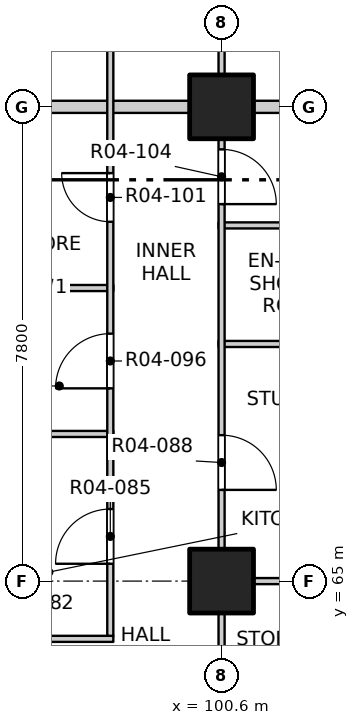
"""IFC4 building model, lengths in metres.
Left out: names, types, materials, properties, quantities, classifications, styles, units other than length and angle.
Written with IfcOpenShell. Run it as: python <this file> out.ifc"""

import sys

from ifc_helpers import new_model, si_unit, direction, frame, frame_2d, origin, origin_2d, place, context, subcontext, project, spatial, rectangle, extrude, element, fill, save


model = new_model("IFC4")
c1 = context("Model", 3, precision=1e-05, world=origin(), true_north=direction((0.0, 1.0)))
c2 = subcontext(c1, "Body", "Model", "MODEL_VIEW")
j1 = project(units=[si_unit("LENGTHUNIT", "METRE"), si_unit("PLANEANGLEUNIT", "RADIAN")], contexts=[c1])
p1 = place(None, origin())
s1 = spatial("IfcSite", under=j1, at=p1, CompositionType="ELEMENT")
p2 = place(p1, origin())
s2 = spatial("IfcBuilding", under=s1, at=p2, CompositionType="ELEMENT")
p3 = place(p2, frame((0.0, 0.0, 58.0)))
s3 = spatial("IfcBuildingStorey", under=s2, at=p3, CompositionType="ELEMENT", Elevation=58.0)
for number, where, z_axis, x_axis in (
    (1, (100.6, 65.0, -0.25), (0.0, 0.0, 1.0), (1.0, 0.0, 0.0)),
    (2, (100.6, 72.8, -0.25), (0.0, 0.0, 1.0), (1.0, 0.0, 0.0)),
):
    element("IfcColumn", number, at=place(p3, frame(where, z_axis=z_axis, x_axis=x_axis)), inside=s3, PredefinedType="COLUMN", context=c2, shape_type="SweptSolid", body=[
        extrude(rectangle(XDim=1.05, YDim=1.05, at=origin_2d()), origin(), (0.0, 0.0, 1.0), 3.4),
    ])
p4 = place(p3, frame((96.6, 64.05, 0.0), z_axis=(0.0, 0.0, 1.0), x_axis=(1.0, 0.0, 0.0)))
e3 = element("IfcWall", 3, at=p4, inside=s3, PredefinedType="PARTITIONING", context=c2, shape_type="SweptSolid", body=[
    extrude(rectangle(XDim=2.22, YDim=0.1, at=frame_2d((1.11, 0.0))), origin(), (0.0, 0.0, 1.0), 3.15),
])
p5 = place(p3, frame((100.55, 65.0, 0.0), z_axis=(0.0, 0.0, 1.0), x_axis=(1.0, 0.0, 0.0)))
e4 = element("IfcWall", 4, at=p5, inside=s3, PredefinedType="PARTITIONING", context=c2, shape_type="SweptSolid", body=[
    extrude(rectangle(XDim=7.55, YDim=0.1, at=frame_2d((3.775, 0.0))), origin(), (0.0, 0.0, 1.0), 2.55),
])
p6 = place(p3, frame((96.6, 67.42, 0.0), z_axis=(0.0, 0.0, 1.0), x_axis=(1.0, 0.0, 0.0)))
e5 = element("IfcWall", 5, at=p6, inside=s3, PredefinedType="PARTITIONING", context=c2, shape_type="SweptSolid", body=[
    extrude(rectangle(XDim=2.22, YDim=0.1, at=frame_2d((1.11, 0.0))), origin(), (0.0, 0.0, 1.0), 3.15),
])
p7 = place(p3, frame((100.55, 68.9, 0.0), z_axis=(0.0, 0.0, 1.0), x_axis=(1.0, 0.0, 0.0)))
e6 = element("IfcWall", 6, at=p7, inside=s3, PredefinedType="PARTITIONING", context=c2, shape_type="SweptSolid", body=[
    extrude(rectangle(XDim=7.55, YDim=0.1, at=frame_2d((3.775, 0.0))), origin(), (0.0, 0.0, 1.0), 3.15),
])
p8 = place(p3, frame((96.6, 69.82, 0.0), z_axis=(0.0, 0.0, 1.0), x_axis=(1.0, 0.0, 0.0)))
e7 = element("IfcWall", 7, at=p8, inside=s3, PredefinedType="PARTITIONING", context=c2, shape_type="SweptSolid", body=[
    extrude(rectangle(XDim=2.22, YDim=0.1, at=frame_2d((1.11, 0.0))), origin(), (0.0, 0.0, 1.0), 3.15),
])
p9 = place(p3, frame((100.55, 70.85, 0.0), z_axis=(0.0, 0.0, 1.0), x_axis=(1.0, 0.0, 0.0)))
e8 = element("IfcWall", 8, at=p9, inside=s3, PredefinedType="PARTITIONING", context=c2, shape_type="SweptSolid", body=[
    extrude(rectangle(XDim=3.7, YDim=0.1, at=frame_2d((1.85, 0.0))), origin(), (0.0, 0.0, 1.0), 3.15),
])
p10 = place(p3, frame((96.6, 72.8, 0.0), z_axis=(0.0, 0.0, 1.0), x_axis=(1.0, 0.0, 0.0)))
e9 = element("IfcWall", 9, at=p10, inside=s3, PredefinedType="PARTITIONING", context=c2, shape_type="SweptSolid", body=[
    extrude(rectangle(XDim=4.0, YDim=0.2, at=frame_2d((2.0, 0.0))), origin(), (0.0, 0.0, 1.0), 3.15),
])
p11 = place(p3, frame((100.6, 72.8, 0.0), z_axis=(0.0, 0.0, 1.0), x_axis=(1.0, 0.0, 0.0)))
e10 = element("IfcWall", 10, at=p11, inside=s3, PredefinedType="PARTITIONING", context=c2, shape_type="SweptSolid", body=[
    extrude(rectangle(XDim=7.5, YDim=0.2, at=frame_2d((3.75, 0.0))), origin(), (0.0, 0.0, 1.0), 2.55),
])
p12 = place(p3, frame((98.77, 64.1, 0.0), z_axis=(0.0, 0.0, 1.0), x_axis=(0.0, 1.0, 0.0)))
e11 = element("IfcWall", 11, at=p12, inside=s3, PredefinedType="PARTITIONING", context=c2, shape_type="SweptSolid", body=[
    extrude(rectangle(XDim=13.95, YDim=0.1, at=frame_2d((6.975, 0.0))), origin(), (0.0, 0.0, 1.0), 3.15),
])
p13 = place(p12, frame((1.185, 0.0, 0.0)))
e12 = element("IfcOpeningElement", 12, at=p13, cuts=e11, PredefinedType="OPENING", context=c2, shape_type="SweptSolid", body=[
    extrude(rectangle(XDim=0.9, YDim=2.1, at=frame_2d((0.45, 1.05))), frame((0.0, 0.06, 0.0), z_axis=(0.0, -1.0, 0.0), x_axis=(1.0, 0.0, 0.0)), (0.0, 0.0, 1.0), 0.12),
])
p14 = place(p12, frame((4.07, 0.0, 0.0)))
e13 = element("IfcOpeningElement", 13, at=p14, cuts=e11, PredefinedType="OPENING", context=c2, shape_type="SweptSolid", body=[
    extrude(rectangle(XDim=0.9, YDim=2.1, at=frame_2d((0.45, 1.05))), frame((0.0, 0.06, 0.0), z_axis=(0.0, -1.0, 0.0), x_axis=(1.0, 0.0, 0.0)), (0.0, 0.0, 1.0), 0.12),
])
p15 = place(p12, frame((6.81, 0.0, 0.0)))
e14 = element("IfcOpeningElement", 14, at=p15, cuts=e11, PredefinedType="OPENING", context=c2, shape_type="SweptSolid", body=[
    extrude(rectangle(XDim=0.8, YDim=2.1, at=frame_2d((0.4, 1.05))), frame((0.0, 0.06, 0.0), z_axis=(0.0, -1.0, 0.0), x_axis=(1.0, 0.0, 0.0)), (0.0, 0.0, 1.0), 0.12),
])
p16 = place(p12, frame((9.71, 0.0, 0.0)))
e15 = element("IfcOpeningElement", 15, at=p16, cuts=e11, PredefinedType="OPENING", context=c2, shape_type="SweptSolid", body=[
    extrude(rectangle(XDim=0.9, YDim=2.1, at=frame_2d((0.45, 1.05))), frame((0.0, 0.06, 0.0), z_axis=(0.0, -1.0, 0.0), x_axis=(1.0, 0.0, 0.0)), (0.0, 0.0, 1.0), 0.12),
])
p17 = place(p12, frame((12.41, 0.0, 0.0)))
e16 = element("IfcOpeningElement", 16, at=p17, cuts=e11, PredefinedType="OPENING", context=c2, shape_type="SweptSolid", body=[
    extrude(rectangle(XDim=0.8, YDim=2.1, at=frame_2d((0.4, 1.05))), frame((0.0, 0.06, 0.0), z_axis=(0.0, -1.0, 0.0), x_axis=(1.0, 0.0, 0.0)), (0.0, 0.0, 1.0), 0.12),
])
p18 = place(p3, frame((100.6, 49.4, 0.0), z_axis=(0.0, 0.0, 1.0), x_axis=(0.0, 1.0, 0.0)))
e17 = element("IfcWall", 17, at=p18, inside=s3, PredefinedType="PARTITIONING", context=c2, shape_type="SweptSolid", body=[
    extrude(rectangle(XDim=31.2, YDim=0.1, at=frame_2d((15.6, 0.0))), origin(), (0.0, 0.0, 1.0), 3.15),
])
p19 = place(p18, frame((2.475, 0.0, 0.0)))
e18 = element("IfcOpeningElement", 18, at=p19, cuts=e17, PredefinedType="OPENING", context=c2, shape_type="SweptSolid", body=[
    extrude(rectangle(XDim=0.9, YDim=2.1, at=frame_2d((0.45, 1.05))), frame((0.0, 0.06, 0.0), z_axis=(0.0, -1.0, 0.0), x_axis=(1.0, 0.0, 0.0)), (0.0, 0.0, 1.0), 0.12),
])
p20 = place(p18, frame((5.4, 0.0, 0.0)))
e19 = element("IfcOpeningElement", 19, at=p20, cuts=e17, PredefinedType="OPENING", context=c2, shape_type="SweptSolid", body=[
    extrude(rectangle(XDim=0.9, YDim=2.1, at=frame_2d((0.45, 1.05))), frame((0.0, 0.06, 0.0), z_axis=(0.0, -1.0, 0.0), x_axis=(1.0, 0.0, 0.0)), (0.0, 0.0, 1.0), 0.12),
])
p21 = place(p18, frame((10.275, 0.0, 0.0)))
e20 = element("IfcOpeningElement", 20, at=p21, cuts=e17, PredefinedType="OPENING", context=c2, shape_type="SweptSolid", body=[
    extrude(rectangle(XDim=0.9, YDim=2.1, at=frame_2d((0.45, 1.05))), frame((0.0, 0.06, 0.0), z_axis=(0.0, -1.0, 0.0), x_axis=(1.0, 0.0, 0.0)), (0.0, 0.0, 1.0), 0.12),
])
p22 = place(p18, frame((13.2, 0.0, 0.0)))
e21 = element("IfcOpeningElement", 21, at=p22, cuts=e17, PredefinedType="OPENING", context=c2, shape_type="SweptSolid", body=[
    extrude(rectangle(XDim=0.9, YDim=2.1, at=frame_2d((0.45, 1.05))), frame((0.0, 0.06, 0.0), z_axis=(0.0, -1.0, 0.0), x_axis=(1.0, 0.0, 0.0)), (0.0, 0.0, 1.0), 0.12),
])
p23 = place(p18, frame((17.1, 0.0, 0.0)))
e22 = element("IfcOpeningElement", 22, at=p23, cuts=e17, PredefinedType="OPENING", context=c2, shape_type="SweptSolid", body=[
    extrude(rectangle(XDim=0.9, YDim=2.1, at=frame_2d((0.45, 1.05))), frame((0.0, 0.06, 0.0), z_axis=(0.0, -1.0, 0.0), x_axis=(1.0, 0.0, 0.0)), (0.0, 0.0, 1.0), 0.12),
])
p24 = place(p18, frame((21.8, 0.0, 0.0)))
e23 = element("IfcOpeningElement", 23, at=p24, cuts=e17, PredefinedType="OPENING", context=c2, shape_type="SweptSolid", body=[
    extrude(rectangle(XDim=0.9, YDim=2.1, at=frame_2d((0.45, 1.05))), frame((0.0, 0.06, 0.0), z_axis=(0.0, -1.0, 0.0), x_axis=(1.0, 0.0, 0.0)), (0.0, 0.0, 1.0), 0.12),
])
p25 = place(p18, frame((25.875, 0.0, 0.0)))
e24 = element("IfcOpeningElement", 24, at=p25, cuts=e17, PredefinedType="OPENING", context=c2, shape_type="SweptSolid", body=[
    extrude(rectangle(XDim=0.9, YDim=2.1, at=frame_2d((0.45, 1.05))), frame((0.0, 0.06, 0.0), z_axis=(0.0, -1.0, 0.0), x_axis=(1.0, 0.0, 0.0)), (0.0, 0.0, 1.0), 0.12),
])
p26 = place(p18, frame((28.8, 0.0, 0.0)))
e25 = element("IfcOpeningElement", 25, at=p26, cuts=e17, PredefinedType="OPENING", context=c2, shape_type="SweptSolid", body=[
    extrude(rectangle(XDim=0.9, YDim=2.1, at=frame_2d((0.45, 1.05))), frame((0.0, 0.06, 0.0), z_axis=(0.0, -1.0, 0.0), x_axis=(1.0, 0.0, 0.0)), (0.0, 0.0, 1.0), 0.12),
])
p27 = place(p13, origin())
e26 = element("IfcDoor", 26, at=p27, inside=s3, OperationType="SINGLE_SWING_LEFT", PredefinedType="DOOR", context=c2, shape_type="SweptSolid", body=[
    extrude(rectangle(XDim=0.9, YDim=2.1, at=frame_2d((0.45, 1.05))), frame((0.0, 0.025, 0.0), z_axis=(0.0, -1.0, 0.0), x_axis=(1.0, 0.0, 0.0)), (0.0, 0.0, 1.0), 0.05),
])
fill(e12, e26)
p28 = place(p23, origin())
e27 = element("IfcDoor", 27, at=p28, inside=s3, OperationType="SINGLE_SWING_RIGHT", PredefinedType="DOOR", context=c2, shape_type="SweptSolid", body=[
    extrude(rectangle(XDim=0.9, YDim=2.1, at=frame_2d((0.45, 1.05))), frame((0.0, 0.025, 0.0), z_axis=(0.0, -1.0, 0.0), x_axis=(1.0, 0.0, 0.0)), (0.0, 0.0, 1.0), 0.05),
])
fill(e22, e27)
p29 = place(p14, origin())
e28 = element("IfcDoor", 28, at=p29, inside=s3, OperationType="SINGLE_SWING_LEFT", PredefinedType="DOOR", context=c2, shape_type="SweptSolid", body=[
    extrude(rectangle(XDim=0.9, YDim=2.1, at=frame_2d((0.45, 1.05))), frame((0.0, 0.025, 0.0), z_axis=(0.0, -1.0, 0.0), x_axis=(1.0, 0.0, 0.0)), (0.0, 0.0, 1.0), 0.05),
])
fill(e13, e28)
p30 = place(p15, origin())
e29 = element("IfcDoor", 29, at=p30, inside=s3, OperationType="SINGLE_SWING_RIGHT", PredefinedType="DOOR", context=c2, shape_type="SweptSolid", body=[
    extrude(rectangle(XDim=0.8, YDim=2.1, at=frame_2d((0.4, 1.05))), frame((0.0, 0.025, 0.0), z_axis=(0.0, -1.0, 0.0), x_axis=(1.0, 0.0, 0.0)), (0.0, 0.0, 1.0), 0.05),
])
fill(e14, e29)
p31 = place(p24, origin())
e30 = element("IfcDoor", 30, at=p31, inside=s3, OperationType="SINGLE_SWING_RIGHT", PredefinedType="DOOR", context=c2, shape_type="SweptSolid", body=[
    extrude(rectangle(XDim=0.9, YDim=2.1, at=frame_2d((0.45, 1.05))), frame((0.0, 0.025, 0.0), z_axis=(0.0, -1.0, 0.0), x_axis=(1.0, 0.0, 0.0)), (0.0, 0.0, 1.0), 0.05),
])
fill(e23, e30)
save(model, sys.argv[1])
